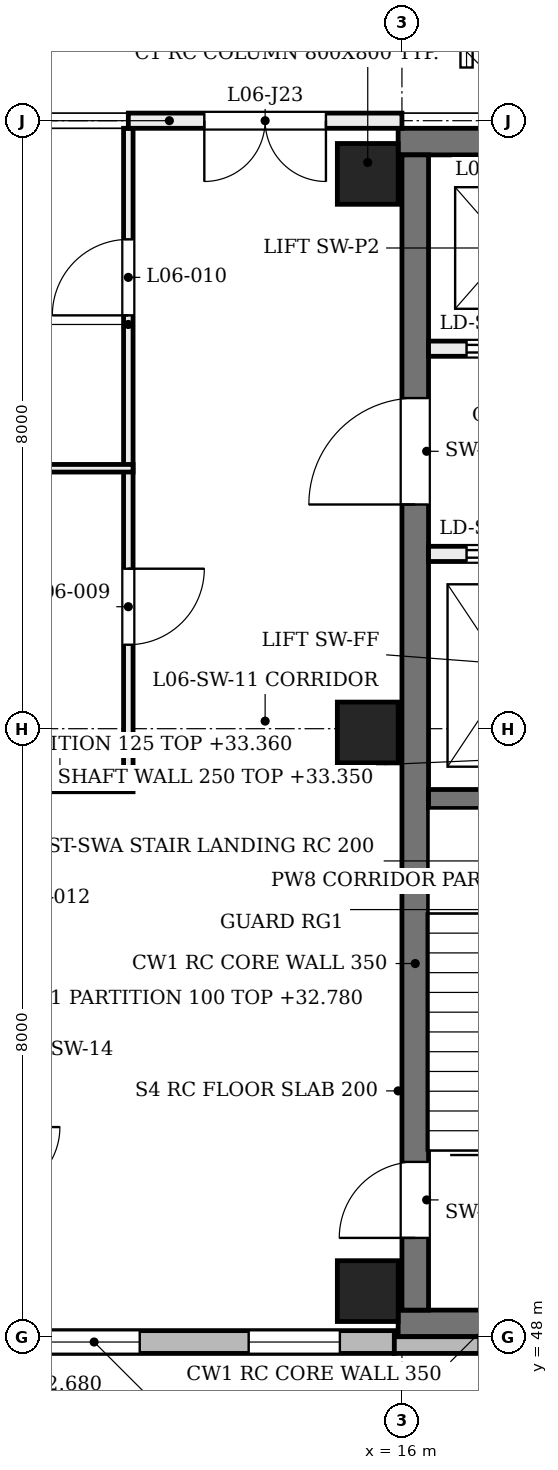
"""IFC4 building model, lengths in metres.
Left out: names, types, materials, properties, quantities, classifications, styles, units other than length and angle.
Written with IfcOpenShell. Run it as: python <this file> out.ifc"""

import sys

from ifc_helpers import new_model, si_unit, direction, frame, frame_2d, origin, origin_2d, place, context, subcontext, project, spatial, rectangle, extrude, element, fill, save


model = new_model("IFC4")
c1 = context("Model", 3, precision=1e-05, world=origin(), true_north=direction((0.0, 1.0)))
c2 = subcontext(c1, "Body", "Model", "MODEL_VIEW")
j1 = project(units=[si_unit("LENGTHUNIT", "METRE"), si_unit("PLANEANGLEUNIT", "RADIAN")], contexts=[c1])
p1 = place(None, origin())
s1 = spatial("IfcSite", under=j1, at=p1, CompositionType="ELEMENT")
p2 = place(p1, origin())
s2 = spatial("IfcBuilding", under=s1, at=p2, CompositionType="ELEMENT")
p3 = place(p2, frame((0.0, 0.0, 28.8)))
s3 = spatial("IfcBuildingStorey", under=s2, at=p3, CompositionType="ELEMENT", Elevation=28.8)
for number, where, z_axis, x_axis in (
    (1, (15.95, 48.175, 0.0), (0.0, 0.0, 1.0), (1.0, 0.0, 0.0)),
    (2, (15.95, 63.725, 0.0), (0.0, 0.0, 1.0), (1.0, 0.0, 0.0)),
):
    element("IfcWall", number, at=place(p3, frame(where, z_axis=z_axis, x_axis=x_axis)), inside=s3, PredefinedType="SHEAR", context=c2, shape_type="SweptSolid", body=[
        extrude(rectangle(XDim=7.95, YDim=0.35, at=frame_2d((3.975, 0.0))), origin(), (0.0, 0.0, 1.0), 4.58),
    ])
p4 = place(p3, frame((16.175, 48.35, 0.0), z_axis=(0.0, 0.0, 1.0), x_axis=(0.0, 1.0, 0.0)))
e3 = element("IfcWall", 3, at=p4, inside=s3, PredefinedType="SHEAR", context=c2, shape_type="SweptSolid", body=[
    extrude(rectangle(XDim=15.2, YDim=0.35, at=frame_2d((7.6, 0.0))), origin(), (0.0, 0.0, 1.0), 4.58),
])
p5 = place(p4, frame((0.95, 0.0, 0.0)))
e4 = element("IfcOpeningElement", 4, at=p5, cuts=e3, PredefinedType="OPENING", context=c2, shape_type="SweptSolid", body=[
    extrude(rectangle(XDim=1.0, YDim=2.1, at=frame_2d((0.5, 1.05))), frame((0.0, 0.185, 0.0), z_axis=(0.0, -1.0, 0.0), x_axis=(1.0, 0.0, 0.0)), (0.0, 0.0, 1.0), 0.37),
])
p6 = place(p4, frame((10.6, 0.0, 0.0)))
e5 = element("IfcOpeningElement", 5, at=p6, cuts=e3, PredefinedType="OPENING", context=c2, shape_type="SweptSolid", body=[
    extrude(rectangle(XDim=1.4, YDim=2.1, at=frame_2d((0.7, 1.05))), frame((0.0, 0.185, 0.0), z_axis=(0.0, -1.0, 0.0), x_axis=(1.0, 0.0, 0.0)), (0.0, 0.0, 1.0), 0.37),
])
for number, where, z_axis, x_axis in (
    (6, (15.55, 48.6, 0.0), (0.0, 0.0, 1.0), (1.0, 0.0, 0.0)),
    (7, (15.55, 55.95, 0.0), (0.0, 0.0, 1.0), (1.0, 0.0, 0.0)),
    (8, (15.55, 63.3, 0.0), (0.0, 0.0, 1.0), (1.0, 0.0, 0.0)),
):
    element("IfcColumn", number, at=place(p3, frame(where, z_axis=z_axis, x_axis=x_axis)), inside=s3, PredefinedType="COLUMN", context=c2, shape_type="SweptSolid", body=[
        extrude(rectangle(XDim=0.8, YDim=0.8, at=origin_2d()), origin(), (0.0, 0.0, 1.0), 4.58),
    ])
p7 = place(p3, frame((8.0, 47.93, 0.0), z_axis=(0.0, 0.0, 1.0), x_axis=(1.0, 0.0, 0.0)))
e9 = element("IfcWall", 9, at=p7, inside=s3, PredefinedType="SOLIDWALL", context=c2, shape_type="SweptSolid", body=[
    extrude(rectangle(XDim=7.9, YDim=0.3, at=frame_2d((3.95, 0.0))), origin(), (0.0, 0.0, 1.0), 3.9),
])
p8 = place(p7, frame((0.717, 0.0, 1.0)))
e10 = element("IfcOpeningElement", 10, at=p8, cuts=e9, PredefinedType="OPENING", context=c2, shape_type="SweptSolid", body=[
    extrude(rectangle(XDim=1.2, YDim=2.4, at=frame_2d((0.6, 1.2))), frame((0.0, 0.16, 0.0), z_axis=(0.0, -1.0, 0.0), x_axis=(1.0, 0.0, 0.0)), (0.0, 0.0, 1.0), 0.32),
])
p9 = place(p7, frame((3.35, 0.0, 1.0)))
e11 = element("IfcOpeningElement", 11, at=p9, cuts=e9, PredefinedType="OPENING", context=c2, shape_type="SweptSolid", body=[
    extrude(rectangle(XDim=1.2, YDim=2.4, at=frame_2d((0.6, 1.2))), frame((0.0, 0.16, 0.0), z_axis=(0.0, -1.0, 0.0), x_axis=(1.0, 0.0, 0.0)), (0.0, 0.0, 1.0), 0.32),
])
p10 = place(p7, frame((5.983, 0.0, 1.0)))
e12 = element("IfcOpeningElement", 12, at=p10, cuts=e9, PredefinedType="OPENING", context=c2, shape_type="SweptSolid", body=[
    extrude(rectangle(XDim=1.2, YDim=2.4, at=frame_2d((0.6, 1.2))), frame((0.0, 0.16, 0.0), z_axis=(0.0, -1.0, 0.0), x_axis=(1.0, 0.0, 0.0)), (0.0, 0.0, 1.0), 0.32),
])
p11 = place(p3, frame((15.9, 47.89, 0.0), z_axis=(0.0, 0.0, 1.0), x_axis=(1.0, 0.0, 0.0)))
e13 = element("IfcWall", 13, at=p11, inside=s3, PredefinedType="SOLIDWALL", context=c2, shape_type="SweptSolid", body=[
    extrude(rectangle(XDim=8.2, YDim=0.22, at=frame_2d((4.1, 0.0))), origin(), (0.0, 0.0, 1.0), 3.9),
])
p12 = place(p11, frame((1.108, 0.0, 0.9)))
e14 = element("IfcOpeningElement", 14, at=p12, cuts=e13, PredefinedType="OPENING", context=c2, shape_type="SweptSolid", body=[
    extrude(rectangle(XDim=0.45, YDim=2.6, at=frame_2d((0.225, 1.3))), frame((0.0, 0.12, 0.0), z_axis=(0.0, -1.0, 0.0), x_axis=(1.0, 0.0, 0.0)), (0.0, 0.0, 1.0), 0.24),
])
p13 = place(p11, frame((3.775, 0.0, 0.9)))
e15 = element("IfcOpeningElement", 15, at=p13, cuts=e13, PredefinedType="OPENING", context=c2, shape_type="SweptSolid", body=[
    extrude(rectangle(XDim=0.45, YDim=2.6, at=frame_2d((0.225, 1.3))), frame((0.0, 0.12, 0.0), z_axis=(0.0, -1.0, 0.0), x_axis=(1.0, 0.0, 0.0)), (0.0, 0.0, 1.0), 0.24),
])
p14 = place(p11, frame((6.442, 0.0, 0.9)))
e16 = element("IfcOpeningElement", 16, at=p14, cuts=e13, PredefinedType="OPENING", context=c2, shape_type="SweptSolid", body=[
    extrude(rectangle(XDim=0.45, YDim=2.6, at=frame_2d((0.225, 1.3))), frame((0.0, 0.12, 0.0), z_axis=(0.0, -1.0, 0.0), x_axis=(1.0, 0.0, 0.0)), (0.0, 0.0, 1.0), 0.24),
])
p15 = place(p3, frame((16.35, 55.075, 0.0), z_axis=(0.0, 0.0, 1.0), x_axis=(1.0, 0.0, 0.0)))
e17 = element("IfcWall", 17, at=p15, inside=s3, PredefinedType="SOLIDWALL", context=c2, shape_type="SweptSolid", body=[
    extrude(rectangle(XDim=3.1, YDim=0.25, at=frame_2d((1.55, 0.0))), origin(), (0.0, 0.0, 1.0), 4.55),
])
p16 = place(p3, frame((16.35, 58.3, 0.0), z_axis=(0.0, 0.0, 1.0), x_axis=(1.0, 0.0, 0.0)))
e18 = element("IfcWall", 18, at=p16, inside=s3, PredefinedType="SOLIDWALL", context=c2, shape_type="SweptSolid", body=[
    extrude(rectangle(XDim=7.2, YDim=0.2, at=frame_2d((3.6, 0.0))), origin(), (0.0, 0.0, 1.0), 4.55),
])
p17 = place(p16, frame((0.5, 0.0, 0.0)))
e19 = element("IfcOpeningElement", 19, at=p17, cuts=e18, PredefinedType="OPENING", context=c2, shape_type="SweptSolid", body=[
    extrude(rectangle(XDim=1.1, YDim=2.1, at=frame_2d((0.55, 1.05))), frame((0.0, 0.11, 0.0), z_axis=(0.0, -1.0, 0.0), x_axis=(1.0, 0.0, 0.0)), (0.0, 0.0, 1.0), 0.22),
])
p18 = place(p16, frame((5.6, 0.0, 0.0)))
e20 = element("IfcOpeningElement", 20, at=p18, cuts=e18, PredefinedType="OPENING", context=c2, shape_type="SweptSolid", body=[
    extrude(rectangle(XDim=1.1, YDim=2.1, at=frame_2d((0.55, 1.05))), frame((0.0, 0.11, 0.0), z_axis=(0.0, -1.0, 0.0), x_axis=(1.0, 0.0, 0.0)), (0.0, 0.0, 1.0), 0.22),
])
p19 = place(p16, frame((3.1, 0.0, 0.0)))
e21 = element("IfcOpeningElement", 21, at=p19, cuts=e18, PredefinedType="OPENING", context=c2, shape_type="SweptSolid", body=[
    extrude(rectangle(XDim=1.0, YDim=2.1, at=frame_2d((0.5, 1.05))), frame((0.0, 0.11, 0.0), z_axis=(0.0, -1.0, 0.0), x_axis=(1.0, 0.0, 0.0)), (0.0, 0.0, 1.0), 0.22),
])
p20 = place(p3, frame((16.35, 61.0, 0.0), z_axis=(0.0, 0.0, 1.0), x_axis=(1.0, 0.0, 0.0)))
e22 = element("IfcWall", 22, at=p20, inside=s3, PredefinedType="SOLIDWALL", context=c2, shape_type="SweptSolid", body=[
    extrude(rectangle(XDim=7.2, YDim=0.2, at=frame_2d((3.6, 0.0))), origin(), (0.0, 0.0, 1.0), 4.55),
])
p21 = place(p20, frame((0.5, 0.0, 0.0)))
e23 = element("IfcOpeningElement", 23, at=p21, cuts=e22, PredefinedType="OPENING", context=c2, shape_type="SweptSolid", body=[
    extrude(rectangle(XDim=1.1, YDim=2.1, at=frame_2d((0.55, 1.05))), frame((0.0, 0.11, 0.0), z_axis=(0.0, -1.0, 0.0), x_axis=(1.0, 0.0, 0.0)), (0.0, 0.0, 1.0), 0.22),
])
p22 = place(p20, frame((5.6, 0.0, 0.0)))
e24 = element("IfcOpeningElement", 24, at=p22, cuts=e22, PredefinedType="OPENING", context=c2, shape_type="SweptSolid", body=[
    extrude(rectangle(XDim=1.1, YDim=2.1, at=frame_2d((0.55, 1.05))), frame((0.0, 0.11, 0.0), z_axis=(0.0, -1.0, 0.0), x_axis=(1.0, 0.0, 0.0)), (0.0, 0.0, 1.0), 0.22),
])
p23 = place(p20, frame((3.1, 0.0, 0.0)))
e25 = element("IfcOpeningElement", 25, at=p23, cuts=e22, PredefinedType="OPENING", context=c2, shape_type="SweptSolid", body=[
    extrude(rectangle(XDim=1.0, YDim=2.1, at=frame_2d((0.5, 1.05))), frame((0.0, 0.11, 0.0), z_axis=(0.0, -1.0, 0.0), x_axis=(1.0, 0.0, 0.0)), (0.0, 0.0, 1.0), 0.22),
])
p24 = place(p3, frame((12.4, 55.296, 0.0), z_axis=(0.0, 0.0, 1.0), x_axis=(0.0, 1.0, 0.0)))
e26 = element("IfcWall", 26, at=p24, inside=s3, PredefinedType="PARTITIONING", context=c2, shape_type="SweptSolid", body=[
    extrude(rectangle(XDim=8.604, YDim=0.125, at=frame_2d((4.302, 0.0))), origin(), (0.0, 0.0, 1.0), 3.88),
])
p25 = place(p24, frame((1.809, 0.0, 0.0)))
e27 = element("IfcOpeningElement", 27, at=p25, cuts=e26, PredefinedType="OPENING", context=c2, shape_type="SweptSolid", body=[
    extrude(rectangle(XDim=1.0, YDim=2.1, at=frame_2d((0.5, 1.05))), frame((0.0, 0.073, 0.0), z_axis=(0.0, -1.0, 0.0), x_axis=(1.0, 0.0, 0.0)), (0.0, 0.0, 1.0), 0.145),
])
p26 = place(p24, frame((6.143, 0.0, 0.0)))
e28 = element("IfcOpeningElement", 28, at=p26, cuts=e26, PredefinedType="OPENING", context=c2, shape_type="SweptSolid", body=[
    extrude(rectangle(XDim=1.0, YDim=2.1, at=frame_2d((0.5, 1.05))), frame((0.0, 0.073, 0.0), z_axis=(0.0, -1.0, 0.0), x_axis=(1.0, 0.0, 0.0)), (0.0, 0.0, 1.0), 0.145),
])
p27 = place(p3, frame((10.538, 55.233, 0.0), z_axis=(0.0, 0.0, 1.0), x_axis=(1.0, 0.0, 0.0)))
e29 = element("IfcWall", 29, at=p27, inside=s3, PredefinedType="PARTITIONING", context=c2, shape_type="SweptSolid", body=[
    extrude(rectangle(XDim=1.925, YDim=0.125, at=frame_2d((0.962, 0.0))), origin(), (0.0, 0.0, 1.0), 4.56),
])
p28 = place(p3, frame((8.3, 59.427, 0.0), z_axis=(0.0, 0.0, 1.0), x_axis=(1.0, 0.0, 0.0)))
e30 = element("IfcWall", 30, at=p28, inside=s3, PredefinedType="PARTITIONING", context=c2, shape_type="SweptSolid", body=[
    extrude(rectangle(XDim=4.162, YDim=0.1, at=frame_2d((2.081, 0.0))), origin(), (0.0, 0.0, 1.0), 3.98),
])
p29 = place(p3, frame((12.4, 64.0, 0.0), z_axis=(0.0, 0.0, 1.0), x_axis=(1.0, 0.0, 0.0)))
e31 = element("IfcWall", 31, at=p29, inside=s3, PredefinedType="PARTITIONING", context=c2, shape_type="SweptSolid", body=[
    extrude(rectangle(XDim=3.6, YDim=0.2, at=frame_2d((1.8, 0.0))), origin(), (0.0, 0.0, 1.0), 3.88),
])
p30 = place(p29, frame((1.0, 0.0, 0.0)))
e32 = element("IfcOpeningElement", 32, at=p30, cuts=e31, PredefinedType="OPENING", context=c2, shape_type="SweptSolid", body=[
    extrude(rectangle(XDim=1.6, YDim=2.1, at=frame_2d((0.8, 1.05))), frame((0.0, 0.11, 0.0), z_axis=(0.0, -1.0, 0.0), x_axis=(1.0, 0.0, 0.0)), (0.0, 0.0, 1.0), 0.22),
])
p31 = place(p9, origin())
e33 = element("IfcWindow", 33, at=p31, inside=s3, PartitioningType="SINGLE_PANEL", PredefinedType="WINDOW", context=c2, shape_type="SweptSolid", body=[
    extrude(rectangle(XDim=1.2, YDim=2.4, at=frame_2d((0.6, 1.2))), frame((0.0, 0.03, 0.0), z_axis=(0.0, -1.0, 0.0), x_axis=(1.0, 0.0, 0.0)), (0.0, 0.0, 1.0), 0.06),
])
fill(e11, e33)
p32 = place(p10, origin())
e34 = element("IfcWindow", 34, at=p32, inside=s3, PartitioningType="SINGLE_PANEL", PredefinedType="WINDOW", context=c2, shape_type="SweptSolid", body=[
    extrude(rectangle(XDim=1.2, YDim=2.4, at=frame_2d((0.6, 1.2))), frame((0.0, 0.03, 0.0), z_axis=(0.0, -1.0, 0.0), x_axis=(1.0, 0.0, 0.0)), (0.0, 0.0, 1.0), 0.06),
])
fill(e12, e34)
p33 = place(p5, origin())
e35 = element("IfcDoor", 35, at=p33, inside=s3, OperationType="SINGLE_SWING_LEFT", PredefinedType="DOOR", context=c2, shape_type="SweptSolid", body=[
    extrude(rectangle(XDim=1.0, YDim=2.1, at=frame_2d((0.5, 1.05))), frame((0.0, 0.025, 0.0), z_axis=(0.0, -1.0, 0.0), x_axis=(1.0, 0.0, 0.0)), (0.0, 0.0, 1.0), 0.05),
])
fill(e4, e35)
p34 = place(p17, origin())
e36 = element("IfcDoor", 36, at=p34, inside=s3, OperationType="DOUBLE_DOOR_SLIDING", PredefinedType="DOOR", context=c2, shape_type="SweptSolid", body=[
    extrude(rectangle(XDim=1.1, YDim=2.1, at=frame_2d((0.55, 1.05))), frame((0.0, 0.025, 0.0), z_axis=(0.0, -1.0, 0.0), x_axis=(1.0, 0.0, 0.0)), (0.0, 0.0, 1.0), 0.05),
])
fill(e19, e36)
p35 = place(p21, frame((1.1, 0.0, 0.0), z_axis=(0.0, 0.0, 1.0), x_axis=(-1.0, 0.0, 0.0)))
e37 = element("IfcDoor", 37, at=p35, inside=s3, OperationType="DOUBLE_DOOR_SLIDING", PredefinedType="DOOR", context=c2, shape_type="SweptSolid", body=[
    extrude(rectangle(XDim=1.1, YDim=2.1, at=frame_2d((0.55, 1.05))), frame((0.0, 0.025, 0.0), z_axis=(0.0, -1.0, 0.0), x_axis=(1.0, 0.0, 0.0)), (0.0, 0.0, 1.0), 0.05),
])
fill(e23, e37)
p36 = place(p6, origin())
e38 = element("IfcDoor", 38, at=p36, inside=s3, OperationType="SINGLE_SWING_LEFT", PredefinedType="DOOR", context=c2, shape_type="SweptSolid", body=[
    extrude(rectangle(XDim=1.4, YDim=2.1, at=frame_2d((0.7, 1.05))), frame((0.0, 0.025, 0.0), z_axis=(0.0, -1.0, 0.0), x_axis=(1.0, 0.0, 0.0)), (0.0, 0.0, 1.0), 0.05),
])
fill(e5, e38)
p37 = place(p25, origin())
e39 = element("IfcDoor", 39, at=p37, inside=s3, OperationType="SINGLE_SWING_RIGHT", PredefinedType="DOOR", context=c2, shape_type="SweptSolid", body=[
    extrude(rectangle(XDim=1.0, YDim=2.1, at=frame_2d((0.5, 1.05))), frame((0.0, 0.025, 0.0), z_axis=(0.0, -1.0, 0.0), x_axis=(1.0, 0.0, 0.0)), (0.0, 0.0, 1.0), 0.05),
])
fill(e27, e39)
p38 = place(p26, origin())
e40 = element("IfcDoor", 40, at=p38, inside=s3, OperationType="SINGLE_SWING_LEFT", PredefinedType="DOOR", context=c2, shape_type="SweptSolid", body=[
    extrude(rectangle(XDim=1.0, YDim=2.1, at=frame_2d((0.5, 1.05))), frame((0.0, 0.025, 0.0), z_axis=(0.0, -1.0, 0.0), x_axis=(1.0, 0.0, 0.0)), (0.0, 0.0, 1.0), 0.05),
])
fill(e28, e40)
p39 = place(p30, frame((1.6, 0.0, 0.0), z_axis=(0.0, 0.0, 1.0), x_axis=(-1.0, 0.0, 0.0)))
e41 = element("IfcDoor", 41, at=p39, inside=s3, OperationType="DOUBLE_DOOR_SINGLE_SWING", PredefinedType="DOOR", context=c2, shape_type="SweptSolid", body=[
    extrude(rectangle(XDim=1.6, YDim=2.1, at=frame_2d((0.8, 1.05))), frame((0.0, 0.025, 0.0), z_axis=(0.0, -1.0, 0.0), x_axis=(1.0, 0.0, 0.0)), (0.0, 0.0, 1.0), 0.05),
])
fill(e32, e41)
save(model, sys.argv[1])
